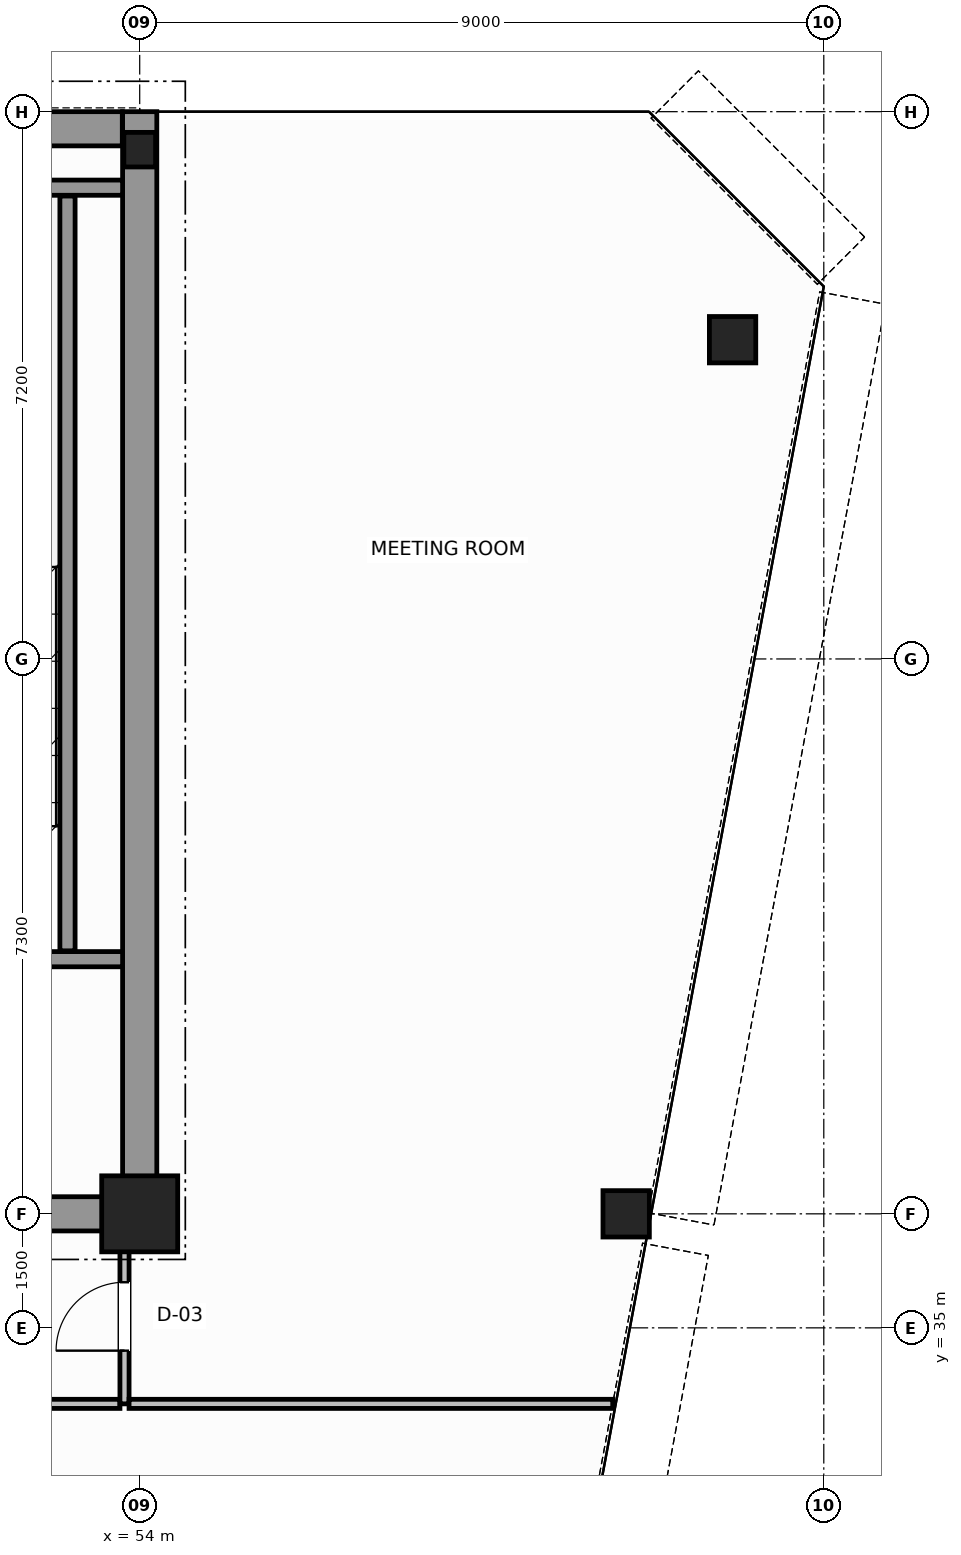
"""IFC4 building model, lengths in metres.
Left out: names, types, materials, properties, quantities, classifications, styles, units other than length and angle.
Written with IfcOpenShell. Run it as: python <this file> out.ifc"""

import sys

from ifc_helpers import new_model, si_unit, direction, frame, frame_2d, origin, origin_2d, place, context, subcontext, project, spatial, rectangle, hollow_circle, i_section, extrude, source, transform, mapped, element, fill, save


model = new_model("IFC4")
c1 = context("Model", 3, precision=1e-05, world=origin(), true_north=direction((0.0, 1.0)))
c2 = subcontext(c1, "Body", "Model", "MODEL_VIEW")
j1 = project(units=[si_unit("LENGTHUNIT", "METRE"), si_unit("PLANEANGLEUNIT", "RADIAN")], contexts=[c1])
p1 = place(None, origin())
s1 = spatial("IfcSite", under=j1, at=p1, CompositionType="ELEMENT")
p2 = place(p1, origin())
s2 = spatial("IfcBuilding", under=s1, at=p2, CompositionType="ELEMENT")
p3 = place(p2, frame((0.0, 0.0, 261.2)))
s3 = spatial("IfcBuildingStorey", under=s2, at=p3, CompositionType="ELEMENT", Elevation=261.2)
m1 = source(origin(), c2, "Body", "SweptSolid", [
    extrude(rectangle(XDim=1.0, YDim=1.0, at=origin_2d()), origin(), (0.0, 0.0, 1.0), 3.8),
])
p4 = place(p3, frame((54.0, 36.5, 0.0), z_axis=(0.0, 0.0, 1.0), x_axis=(1.0, 0.0, 0.0)))
e1 = element("IfcColumn", 1, at=p4, inside=s3, PredefinedType="COLUMN", context=c2, shape_type="MappedRepresentation", body=[
    mapped(m1, transform((0.0, 0.0, 0.0), scale=1.0)),
])
m2 = source(origin(), c2, "Body", "SweptSolid", [
    extrude(i_section(OverallWidth=0.418, OverallDepth=0.455, WebThickness=0.042, FlangeThickness=0.058, FilletRadius=0.015, at=origin_2d()), origin(), (0.0, 0.0, 1.0), 3.8),
])
p5 = place(p3, frame((54.0, 50.5, 0.0), z_axis=(0.0, 0.0, 1.0), x_axis=(1.0, 0.0, 0.0)))
e2 = element("IfcColumn", 2, at=p5, inside=s3, PredefinedType="COLUMN", context=c2, shape_type="MappedRepresentation", body=[
    mapped(m2, transform((0.0, 0.0, 0.0), scale=1.0)),
])
m3 = source(origin(), c2, "Body", "SweptSolid", [
    extrude(hollow_circle(Radius=0.305, WallThickness=0.03, at=origin_2d()), origin(), (0.0, 0.0, 1.0), 3.8),
])
for number, where, z_axis, x_axis in (
    (3, (61.8, 48.0, 0.0), (0.0, 0.0, 1.0), (1.0, 0.0, 0.0)),
    (4, (60.4, 36.5, 0.0), (0.0, 0.0, 1.0), (1.0, 0.0, 0.0)),
):
    element("IfcColumn", number, at=place(p3, frame(where, z_axis=z_axis, x_axis=x_axis)), inside=s3, PredefinedType="COLUMN", context=c2, shape_type="MappedRepresentation", body=[
        mapped(m3, transform((0.0, 0.0, 0.0), scale=1.0)),
    ])
p6 = place(p3, frame((34.002, 50.775, 0.0), z_axis=(0.0, 0.0, 1.0), x_axis=(1.0, 0.0, 0.0)))
e5 = element("IfcWall", 5, at=p6, inside=s3, PredefinedType="SHEAR", context=c2, shape_type="SweptSolid", body=[
    extrude(rectangle(XDim=19.769, YDim=0.45, at=frame_2d((9.885, 0.0))), origin(), (0.0, 0.0, 1.0), 3.8),
])
p7 = place(p3, frame((54.0, 36.5, 0.0), z_axis=(0.0, 0.0, 1.0), x_axis=(0.0, 1.0, 0.0)))
e6 = element("IfcWall", 6, at=p7, inside=s3, PredefinedType="SHEAR", context=c2, shape_type="SweptSolid", body=[
    extrude(rectangle(XDim=14.5, YDim=0.45, at=frame_2d((7.25, 0.0))), origin(), (0.0, 0.0, 1.0), 3.8),
])
p8 = place(p3, frame((49.8, 36.5, 0.0), z_axis=(0.0, 0.0, 1.0), x_axis=(1.0, 0.0, 0.0)))
e7 = element("IfcWall", 7, at=p8, inside=s3, PredefinedType="SHEAR", context=c2, shape_type="SweptSolid", body=[
    extrude(rectangle(XDim=3.955, YDim=0.45, at=frame_2d((1.978, 0.0))), origin(), (0.0, 0.0, 1.0), 2.58),
])
p9 = place(p3, frame((49.4, 39.85, 0.0), z_axis=(0.0, 0.0, 1.0), x_axis=(1.0, 0.0, 0.0)))
e8 = element("IfcWall", 8, at=p9, inside=s3, PredefinedType="SOLIDWALL", context=c2, shape_type="SweptSolid", body=[
    extrude(rectangle(XDim=4.375, YDim=0.2, at=frame_2d((2.188, 0.0))), origin(), (0.0, 0.0, 1.0), 3.8),
])
p10 = place(p9, frame((1.325, 0.0, 0.0)))
e9 = element("IfcOpeningElement", 9, at=p10, cuts=e8, PredefinedType="OPENING", context=c2, shape_type="SweptSolid", body=[
    extrude(rectangle(XDim=1.1, YDim=2.15, at=frame_2d((0.55, 1.075))), frame((0.0, 0.11, 0.0), z_axis=(0.0, -1.0, 0.0), x_axis=(1.0, 0.0, 0.0)), (0.0, 0.0, 1.0), 0.22),
])
p11 = place(p3, frame((49.4, 50.0, 0.0), z_axis=(0.0, 0.0, 1.0), x_axis=(1.0, 0.0, 0.0)))
e10 = element("IfcWall", 10, at=p11, inside=s3, PredefinedType="SOLIDWALL", context=c2, shape_type="SweptSolid", body=[
    extrude(rectangle(XDim=4.375, YDim=0.2, at=frame_2d((2.188, 0.0))), origin(), (0.0, 0.0, 1.0), 3.8),
])
p12 = place(p3, frame((53.05, 39.96, 0.0), z_axis=(0.0, 0.0, 1.0), x_axis=(0.0, 1.0, 0.0)))
e11 = element("IfcWall", 11, at=p12, inside=s3, PredefinedType="SOLIDWALL", context=c2, shape_type="SweptSolid", body=[
    extrude(rectangle(XDim=9.93, YDim=0.2, at=frame_2d((4.965, 0.0))), origin(), (0.0, 0.0, 1.0), 3.8),
])
p13 = place(p3, frame((33.26, 34.0, 0.0), z_axis=(0.0, 0.0, 1.0), x_axis=(1.0, 0.0, 0.0)))
e12 = element("IfcWall", 12, at=p13, inside=s3, PredefinedType="PARTITIONING", context=c2, shape_type="SweptSolid", body=[
    extrude(rectangle(XDim=20.48, YDim=0.12, at=frame_2d((10.24, 0.0))), origin(), (0.0, 0.0, 1.0), 3.58),
])
p14 = place(p3, frame((53.8, 34.0, 0.0), z_axis=(0.0, 0.0, 1.0), x_axis=(0.0, 1.0, 0.0)))
e13 = element("IfcWall", 13, at=p14, inside=s3, PredefinedType="PARTITIONING", context=c2, shape_type="SweptSolid", body=[
    extrude(rectangle(XDim=2.44, YDim=0.12, at=frame_2d((1.22, 0.0))), origin(), (0.0, 0.0, 1.0), 3.58),
])
p15 = place(p14, frame((0.7, 0.0, 0.0)))
e14 = element("IfcOpeningElement", 14, at=p15, cuts=e13, PredefinedType="OPENING", context=c2, shape_type="SweptSolid", body=[
    extrude(rectangle(XDim=0.9, YDim=2.15, at=frame_2d((0.45, 1.075))), frame((0.0, 0.07, 0.0), z_axis=(0.0, -1.0, 0.0), x_axis=(1.0, 0.0, 0.0)), (0.0, 0.0, 1.0), 0.14),
])
p16 = place(p3, frame((53.86, 34.0, 0.0), z_axis=(0.0, 0.0, 1.0), x_axis=(1.0, 0.0, 0.0)))
e15 = element("IfcWall", 15, at=p16, inside=s3, PredefinedType="PARTITIONING", context=c2, shape_type="SweptSolid", body=[
    extrude(rectangle(XDim=6.363, YDim=0.12, at=frame_2d((3.181, 0.0))), origin(), (0.0, 0.0, 1.0), 3.58),
])
m4 = source(origin(), c2, "Body", "SweptSolid", [
    extrude(rectangle(XDim=0.9, YDim=2.15, at=frame_2d((0.45, 1.075))), frame((0.0, 0.025, 0.0), z_axis=(0.0, -1.0, 0.0), x_axis=(1.0, 0.0, 0.0)), (0.0, 0.0, 1.0), 0.05),
])
p17 = place(p15, origin())
e16 = element("IfcDoor", 16, at=p17, inside=s3, OperationType="SINGLE_SWING_RIGHT", PredefinedType="DOOR", context=c2, shape_type="MappedRepresentation", body=[
    mapped(m4, transform((0.0, 0.0, 0.0), scale=1.0)),
])
fill(e14, e16)
save(model, sys.argv[1])
